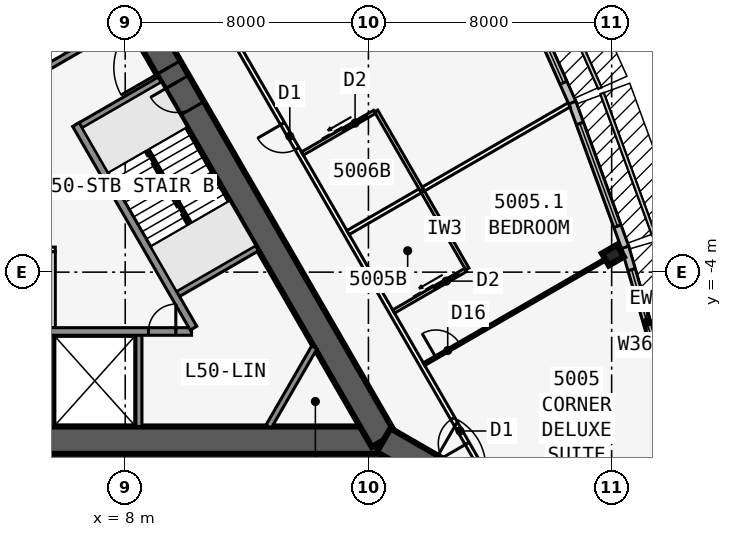
"""IFC4 building model, lengths in metres.
Left out: names, types, materials, properties, quantities, classifications, styles, units other than length and angle.
Written with IfcOpenShell. Run it as: python <this file> out.ifc"""

import sys

from ifc_helpers import new_model, si_unit, direction, frame, frame_2d, origin, origin_2d, place, context, subcontext, project, spatial, rectangle, i_section, extrude, element, fill, save


model = new_model("IFC4")
c1 = context("Model", 3, precision=1e-05, world=origin(), true_north=direction((0.0, 1.0)))
c2 = subcontext(c1, "Body", "Model", "MODEL_VIEW")
j1 = project(units=[si_unit("LENGTHUNIT", "METRE"), si_unit("PLANEANGLEUNIT", "RADIAN")], contexts=[c1])
p1 = place(None, origin())
s1 = spatial("IfcSite", under=j1, at=p1, CompositionType="ELEMENT")
p2 = place(p1, origin())
s2 = spatial("IfcBuilding", under=s1, at=p2, CompositionType="ELEMENT")
p3 = place(p2, frame((0.0, 0.0, 186.1)))
s3 = spatial("IfcBuildingStorey", under=s2, at=p3, CompositionType="ELEMENT", Elevation=186.1)
p4 = place(p3, frame((-16.5, -9.526, 0.0), z_axis=(0.0, 0.0, 1.0), x_axis=(1.0, 0.0, 0.0)))
e1 = element("IfcWall", 1, at=p4, inside=s3, PredefinedType="SHEAR", context=c2, shape_type="SweptSolid", body=[
    extrude(rectangle(XDim=33.0, YDim=0.9, at=frame_2d((16.5, 0.0))), origin(), (0.0, 0.0, 1.0), 3.4),
])
p5 = place(p4, frame((14.05, 0.0, 0.0)))
e2 = element("IfcOpeningElement", 2, at=p5, cuts=e1, PredefinedType="OPENING", context=c2, shape_type="SweptSolid", body=[
    extrude(rectangle(XDim=1.8, YDim=2.13, at=frame_2d((0.9, 1.065))), frame((0.0, 0.46, 0.0), z_axis=(0.0, -1.0, 0.0), x_axis=(1.0, 0.0, 0.0)), (0.0, 0.0, 1.0), 0.92),
])
p6 = place(p3, frame((-0.55, -5.951, 0.0), z_axis=(0.0, 0.0, 1.0), x_axis=(1.0, 0.0, 0.0)))
e3 = element("IfcWall", 3, at=p6, inside=s3, PredefinedType="SOLIDWALL", context=c2, shape_type="SweptSolid", body=[
    extrude(rectangle(XDim=10.733, YDim=0.25, at=frame_2d((5.366, 0.0))), origin(), (0.0, 0.0, 1.0), 3.15),
])
p7 = place(p6, frame((9.314, 0.0, 0.0)))
e4 = element("IfcOpeningElement", 4, at=p7, cuts=e3, PredefinedType="OPENING", context=c2, shape_type="SweptSolid", body=[
    extrude(rectangle(XDim=0.9, YDim=2.13, at=frame_2d((0.45, 1.065))), frame((0.0, 0.135, 0.0), z_axis=(0.0, -1.0, 0.0), x_axis=(1.0, 0.0, 0.0)), (0.0, 0.0, 1.0), 0.27),
])
p8 = place(p6, frame((1.05, 0.0, 0.0)))
e5 = element("IfcOpeningElement", 5, at=p8, cuts=e3, PredefinedType="OPENING", context=c2, shape_type="SweptSolid", body=[
    extrude(rectangle(XDim=1.1, YDim=2.13, at=frame_2d((0.55, 1.065))), frame((0.0, 0.135, 0.0), z_axis=(0.0, -1.0, 0.0), x_axis=(1.0, 0.0, 0.0)), (0.0, 0.0, 1.0), 0.27),
])
p9 = place(p6, frame((4.05, 0.0, 0.0)))
e6 = element("IfcOpeningElement", 6, at=p9, cuts=e3, PredefinedType="OPENING", context=c2, shape_type="SweptSolid", body=[
    extrude(rectangle(XDim=1.1, YDim=2.13, at=frame_2d((0.55, 1.065))), frame((0.0, 0.135, 0.0), z_axis=(0.0, -1.0, 0.0), x_axis=(1.0, 0.0, 0.0)), (0.0, 0.0, 1.0), 0.27),
])
for number, where, z_axis, x_axis in (
    (7, (5.55, -5.951, 0.0), (0.0, 0.0, 1.0), (0.0, -1.0, 0.0)),
    (8, (8.45, -5.951, 0.0), (0.0, 0.0, 1.0), (0.0, -1.0, 0.0)),
):
    element("IfcWall", number, at=place(p3, frame(where, z_axis=z_axis, x_axis=x_axis)), inside=s3, PredefinedType="SOLIDWALL", context=c2, shape_type="SweptSolid", body=[
        extrude(rectangle(XDim=3.125, YDim=0.2, at=frame_2d((1.562, 0.0))), origin(), (0.0, 0.0, 1.0), 3.15),
    ])
p10 = place(p3, frame((16.5, -9.526, 0.0), z_axis=(0.0, 0.0, 1.0), x_axis=(-0.499999749417, 0.866025548458, 0.0)))
e9 = element("IfcWall", 9, at=p10, inside=s3, PredefinedType="SHEAR", context=c2, shape_type="SweptSolid", body=[
    extrude(rectangle(XDim=33.0, YDim=0.9, at=frame_2d((16.5, 0.0))), origin(), (0.0, 0.0, 1.0), 3.4),
])
p11 = place(p10, frame((14.15, 0.0, 0.0)))
e10 = element("IfcOpeningElement", 10, at=p11, cuts=e9, PredefinedType="OPENING", context=c2, shape_type="SweptSolid", body=[
    extrude(rectangle(XDim=1.8, YDim=2.13, at=frame_2d((0.9, 1.065))), frame((0.0, 0.46, 0.0), z_axis=(0.0, -1.0, 0.0), x_axis=(1.0, 0.0, 0.0)), (0.0, 0.0, 1.0), 0.92),
])
p12 = place(p10, frame((12.6, 0.0, 0.0)))
e11 = element("IfcOpeningElement", 11, at=p12, cuts=e9, PredefinedType="OPENING", context=c2, shape_type="SweptSolid", body=[
    extrude(rectangle(XDim=1.0, YDim=2.13, at=frame_2d((0.5, 1.065))), frame((0.0, 0.46, 0.0), z_axis=(0.0, -1.0, 0.0), x_axis=(1.0, 0.0, 0.0)), (0.0, 0.0, 1.0), 0.92),
])
p13 = place(p3, frame((10.245, -5.843, 0.0), z_axis=(0.0, 0.0, 1.0), x_axis=(-0.499993009313, 0.866029439822, 0.0)))
e12 = element("IfcWall", 12, at=p13, inside=s3, PredefinedType="SOLIDWALL", context=c2, shape_type="SweptSolid", body=[
    extrude(rectangle(XDim=7.733, YDim=0.25, at=frame_2d((3.866, 0.0))), origin(), (0.0, 0.0, 1.0), 3.15),
])
for number, where, z_axis, x_axis in (
    (13, (9.629, -4.775, 0.0), (0.0, 0.0, 1.0), (0.866, 0.5, 0.0)),
    (14, (6.429, 0.767, 0.0), (0.0, 0.0, 1.0), (0.866, 0.5, 0.0)),
    (15, (5.329, 2.673, 0.0), (0.0, 0.0, 1.0), (0.866, 0.5, 0.0)),
):
    element("IfcWall", number, at=place(p3, frame(where, z_axis=z_axis, x_axis=x_axis)), inside=s3, PredefinedType="SOLIDWALL", context=c2, shape_type="SweptSolid", body=[
        extrude(rectangle(XDim=3.125, YDim=0.2, at=frame_2d((1.562, 0.0))), origin(), (0.0, 0.0, 1.0), 3.15),
    ])
p14 = place(p3, frame((16.5, -9.526, 0.0), z_axis=(0.0, 0.0, 1.0), x_axis=(0.866031398331, -0.499989616998, 0.0)))
e16 = element("IfcWall", 16, at=p14, inside=s3, PredefinedType="SHEAR", context=c2, shape_type="SweptSolid", body=[
    extrude(rectangle(XDim=4.746, YDim=0.9, at=frame_2d((2.373, 0.0))), origin(), (0.0, 0.0, 1.0), 3.4),
])
p15 = place(p14, frame((1.8, 0.0, 0.0)))
e17 = element("IfcOpeningElement", 17, at=p15, cuts=e16, PredefinedType="OPENING", context=c2, shape_type="SweptSolid", body=[
    extrude(rectangle(XDim=1.8, YDim=2.13, at=frame_2d((0.9, 1.065))), frame((0.0, 0.46, 0.0), z_axis=(0.0, -1.0, 0.0), x_axis=(1.0, 0.0, 0.0)), (0.0, 0.0, 1.0), 0.92),
])
p16 = place(p3, frame((24.041, -3.44, 0.0), z_axis=(0.0, 0.0, 1.0), x_axis=(-0.5, 0.866025403784, 0.0)))
e18 = element("IfcColumn", 18, at=p16, inside=s3, PredefinedType="COLUMN", context=c2, shape_type="SweptSolid", body=[
    extrude(i_section(OverallWidth=0.455, OverallDepth=0.569, WebThickness=0.078, FlangeThickness=0.125, at=origin_2d()), origin(), (0.0, 0.0, 1.0), 3.4),
])
p17 = place(p3, frame((25.88, -8.118, 0.0), z_axis=(0.0, 0.0, 1.0), x_axis=(-0.279528287117, 0.960137457191, 0.0)))
e19 = element("IfcWall", 19, at=p17, inside=s3, PredefinedType="STANDARD", context=c2, shape_type="SweptSolid", body=[
    extrude(rectangle(XDim=5.148, YDim=0.25, at=frame_2d((2.574, 0.0))), origin(), (0.0, 0.0, 1.0), 3.15),
])
p18 = place(p17, frame((0.774, 0.0, 0.45)))
e20 = element("IfcOpeningElement", 20, at=p18, cuts=e19, PredefinedType="OPENING", context=c2, shape_type="SweptSolid", body=[
    extrude(rectangle(XDim=3.6, YDim=2.4, at=frame_2d((1.8, 1.2))), frame((0.0, 0.135, 0.0), z_axis=(0.0, -1.0, 0.0), x_axis=(1.0, 0.0, 0.0)), (0.0, 0.0, 1.0), 0.27),
])
p19 = place(p3, frame((24.444, -3.183, 0.0), z_axis=(0.0, 0.0, 1.0), x_axis=(-0.343225593282, 0.939252996863, 0.0)))
e21 = element("IfcWall", 21, at=p19, inside=s3, PredefinedType="STANDARD", context=c2, shape_type="SweptSolid", body=[
    extrude(rectangle(XDim=5.076, YDim=0.25, at=frame_2d((2.538, 0.0))), origin(), (0.0, 0.0, 1.0), 3.15),
])
p20 = place(p19, frame((0.738, 0.0, 0.45)))
e22 = element("IfcOpeningElement", 22, at=p20, cuts=e21, PredefinedType="OPENING", context=c2, shape_type="SweptSolid", body=[
    extrude(rectangle(XDim=3.6, YDim=2.4, at=frame_2d((1.8, 1.2))), frame((0.0, 0.135, 0.0), z_axis=(0.0, -1.0, 0.0), x_axis=(1.0, 0.0, 0.0)), (0.0, 0.0, 1.0), 0.27),
])
p21 = place(p3, frame((22.705, 1.576, 0.0), z_axis=(0.0, 0.0, 1.0), x_axis=(-0.406832200364, 0.913502906808, 0.0)))
e23 = element("IfcWall", 23, at=p21, inside=s3, PredefinedType="STANDARD", context=c2, shape_type="SweptSolid", body=[
    extrude(rectangle(XDim=5.028, YDim=0.25, at=frame_2d((2.514, 0.0))), origin(), (0.0, 0.0, 1.0), 3.15),
])
p22 = place(p21, frame((0.714, 0.0, 0.45)))
e24 = element("IfcOpeningElement", 24, at=p22, cuts=e23, PredefinedType="OPENING", context=c2, shape_type="SweptSolid", body=[
    extrude(rectangle(XDim=3.6, YDim=2.4, at=frame_2d((1.8, 1.2))), frame((0.0, 0.135, 0.0), z_axis=(0.0, -1.0, 0.0), x_axis=(1.0, 0.0, 0.0)), (0.0, 0.0, 1.0), 0.27),
])
p23 = place(p3, frame((20.027, -10.985, 0.0), z_axis=(0.0, 0.0, 1.0), x_axis=(-0.500001677587, 0.866024435227, 0.0)))
e25 = element("IfcWall", 25, at=p23, inside=s3, PredefinedType="PARTITIONING", context=c2, shape_type="SweptSolid", body=[
    extrude(rectangle(XDim=39.054, YDim=0.15, at=frame_2d((19.527, 0.0))), origin(), (0.0, 0.0, 1.0), 3.15),
])
p24 = place(p23, frame((1.558, 0.0, 0.0)))
e26 = element("IfcOpeningElement", 26, at=p24, cuts=e25, PredefinedType="OPENING", context=c2, shape_type="SweptSolid", body=[
    extrude(rectangle(XDim=0.95, YDim=2.13, at=frame_2d((0.475, 1.065))), frame((0.0, 0.085, 0.0), z_axis=(0.0, -1.0, 0.0), x_axis=(1.0, 0.0, 0.0)), (0.0, 0.0, 1.0), 0.17),
])
p25 = place(p23, frame((12.752, 0.0, 0.0)))
e27 = element("IfcOpeningElement", 27, at=p25, cuts=e25, PredefinedType="OPENING", context=c2, shape_type="SweptSolid", body=[
    extrude(rectangle(XDim=0.95, YDim=2.13, at=frame_2d((0.475, 1.065))), frame((0.0, 0.085, 0.0), z_axis=(0.0, -1.0, 0.0), x_axis=(1.0, 0.0, 0.0)), (0.0, 0.0, 1.0), 0.17),
])
p26 = place(p23, frame((26.552, 0.0, 0.0)))
e28 = element("IfcOpeningElement", 28, at=p26, cuts=e25, PredefinedType="OPENING", context=c2, shape_type="SweptSolid", body=[
    extrude(rectangle(XDim=0.95, YDim=2.13, at=frame_2d((0.475, 1.065))), frame((0.0, 0.085, 0.0), z_axis=(0.0, -1.0, 0.0), x_axis=(1.0, 0.0, 0.0)), (0.0, 0.0, 1.0), 0.17),
])
p27 = place(p23, frame((37.752, 0.0, 0.0)))
e29 = element("IfcOpeningElement", 29, at=p27, cuts=e25, PredefinedType="OPENING", context=c2, shape_type="SweptSolid", body=[
    extrude(rectangle(XDim=0.95, YDim=2.13, at=frame_2d((0.475, 1.065))), frame((0.0, 0.085, 0.0), z_axis=(0.0, -1.0, 0.0), x_axis=(1.0, 0.0, 0.0)), (0.0, 0.0, 1.0), 0.17),
])
p28 = place(p3, frame((17.829, -7.027, 0.0), z_axis=(0.0, 0.0, 1.0), x_axis=(0.866029804378, 0.499992377871, 0.0)))
e30 = element("IfcWall", 30, at=p28, inside=s3, PredefinedType="PARTITIONING", context=c2, shape_type="SweptSolid", body=[
    extrude(rectangle(XDim=7.516, YDim=0.1, at=frame_2d((3.758, 0.0))), origin(), (0.0, 0.0, 1.0), 2.05),
])
p29 = place(p28, frame((0.45, 0.0, 0.0)))
e31 = element("IfcOpeningElement", 31, at=p29, cuts=e30, PredefinedType="OPENING", context=c2, shape_type="SweptSolid", body=[
    extrude(rectangle(XDim=0.9, YDim=2.032, at=frame_2d((0.45, 1.016))), frame((0.0, 0.06, 0.0), z_axis=(0.0, -1.0, 0.0), x_axis=(1.0, 0.0, 0.0)), (0.0, 0.0, 1.0), 0.12),
])
p30 = place(p3, frame((15.329, -2.697, 0.0), z_axis=(0.0, 0.0, 1.0), x_axis=(0.866024316602, 0.50000188305, 0.0)))
e32 = element("IfcWall", 32, at=p30, inside=s3, PredefinedType="PARTITIONING", context=c2, shape_type="SweptSolid", body=[
    extrude(rectangle(XDim=8.395, YDim=0.15, at=frame_2d((4.198, 0.0))), origin(), (0.0, 0.0, 1.0), 2.108),
])
p31 = place(p3, frame((19.253, -3.895, 0.0), z_axis=(0.0, 0.0, 1.0), x_axis=(-0.499990139034, 0.866031096941, 0.0)))
e33 = element("IfcWall", 33, at=p31, inside=s3, PredefinedType="PLUMBINGWALL", context=c2, shape_type="SweptSolid", body=[
    extrude(rectangle(XDim=3.0, YDim=0.12, at=frame_2d((1.5, 0.0))), origin(), (0.0, 0.0, 1.0), 3.15),
])
p32 = place(p3, frame((16.829, -5.295, 0.0), z_axis=(0.0, 0.0, 1.0), x_axis=(0.866035715982, 0.499982138324, 0.0)))
e34 = element("IfcWall", 34, at=p32, inside=s3, PredefinedType="PLUMBINGWALL", context=c2, shape_type="SweptSolid", body=[
    extrude(rectangle(XDim=2.74, YDim=0.12, at=frame_2d((1.37, 0.0))), origin(), (0.0, 0.0, 1.0), 3.15),
])
p33 = place(p32, frame((1.55, 0.0, 0.0)))
e35 = element("IfcOpeningElement", 35, at=p33, cuts=e34, PredefinedType="OPENING", context=c2, shape_type="SweptSolid", body=[
    extrude(rectangle(XDim=0.9, YDim=2.13, at=frame_2d((0.45, 1.065))), frame((0.0, 0.07, 0.0), z_axis=(0.0, -1.0, 0.0), x_axis=(1.0, 0.0, 0.0)), (0.0, 0.0, 1.0), 0.14),
])
p34 = place(p3, frame((17.753, -1.297, 0.0), z_axis=(0.0, 0.0, 1.0), x_axis=(-0.499990139034, 0.866031096941, 0.0)))
e36 = element("IfcWall", 36, at=p34, inside=s3, PredefinedType="PLUMBINGWALL", context=c2, shape_type="SweptSolid", body=[
    extrude(rectangle(XDim=3.0, YDim=0.12, at=frame_2d((1.5, 0.0))), origin(), (0.0, 0.0, 1.0), 3.15),
])
p35 = place(p3, frame((13.829, -0.099, 0.0), z_axis=(0.0, 0.0, 1.0), x_axis=(0.865997131366, 0.500048966069, 0.0)))
e37 = element("IfcWall", 37, at=p35, inside=s3, PredefinedType="PLUMBINGWALL", context=c2, shape_type="SweptSolid", body=[
    extrude(rectangle(XDim=2.74, YDim=0.12, at=frame_2d((1.37, 0.0))), origin(), (0.0, 0.0, 1.0), 3.15),
])
p36 = place(p35, frame((1.55, 0.0, 0.0)))
e38 = element("IfcOpeningElement", 38, at=p36, cuts=e37, PredefinedType="OPENING", context=c2, shape_type="SweptSolid", body=[
    extrude(rectangle(XDim=0.9, YDim=2.13, at=frame_2d((0.45, 1.065))), frame((0.0, 0.07, 0.0), z_axis=(0.0, -1.0, 0.0), x_axis=(1.0, 0.0, 0.0)), (0.0, 0.0, 1.0), 0.14),
])
p37 = place(p3, frame((-2.65, -3.251, 0.0), z_axis=(0.0, 0.0, 1.0), x_axis=(1.0, 0.0, 0.0)))
e39 = element("IfcWall", 39, at=p37, inside=s3, PredefinedType="PARTITIONING", context=c2, shape_type="SweptSolid", body=[
    extrude(rectangle(XDim=8.35, YDim=0.15, at=frame_2d((4.175, 0.0))), origin(), (0.0, 0.0, 1.0), 3.15),
])
p38 = place(p3, frame((5.625, -5.826, 0.0), z_axis=(0.0, 0.0, 1.0), x_axis=(0.0, 1.0, 0.0)))
e40 = element("IfcWall", 40, at=p38, inside=s3, PredefinedType="PARTITIONING", context=c2, shape_type="SweptSolid", body=[
    extrude(rectangle(XDim=2.5, YDim=0.15, at=frame_2d((1.25, 0.0))), origin(), (0.0, 0.0, 1.0), 3.15),
])
p39 = place(p3, frame((14.219, -6.476, 0.0), z_axis=(0.0, 0.0, 1.0), x_axis=(-0.499952404951, -0.866052881055, 0.0)))
e41 = element("IfcWall", 41, at=p39, inside=s3, PredefinedType="SOLIDWALL", context=c2, shape_type="SweptSolid", body=[
    extrude(rectangle(XDim=3.002, YDim=0.2, at=frame_2d((1.501, 0.0))), origin(), (0.0, 0.0, 1.0), 3.15),
])
p40 = place(p3, frame((10.135, -2.401, 0.0), z_axis=(0.0, 0.0, 1.0), x_axis=(-0.499992232847, 0.866029888106, 0.0)))
e42 = element("IfcWall", 42, at=p40, inside=s3, PredefinedType="SOLIDWALL", context=c2, shape_type="SweptSolid", body=[
    extrude(rectangle(XDim=2.794, YDim=0.1, at=frame_2d((1.397, 0.0))), origin(), (0.0, 0.0, 1.0), 3.4),
])
p41 = place(p18, origin())
e43 = element("IfcWindow", 43, at=p41, inside=s3, PartitioningType="SINGLE_PANEL", PredefinedType="WINDOW", context=c2, shape_type="SweptSolid", body=[
    extrude(rectangle(XDim=3.6, YDim=2.4, at=frame_2d((1.8, 1.2))), frame((0.0, 0.03, 0.0), z_axis=(0.0, -1.0, 0.0), x_axis=(1.0, 0.0, 0.0)), (0.0, 0.0, 1.0), 0.06),
])
fill(e20, e43)
p42 = place(p20, origin())
e44 = element("IfcWindow", 44, at=p42, inside=s3, PartitioningType="SINGLE_PANEL", PredefinedType="WINDOW", context=c2, shape_type="SweptSolid", body=[
    extrude(rectangle(XDim=3.6, YDim=2.4, at=frame_2d((1.8, 1.2))), frame((0.0, 0.03, 0.0), z_axis=(0.0, -1.0, 0.0), x_axis=(1.0, 0.0, 0.0)), (0.0, 0.0, 1.0), 0.06),
])
fill(e22, e44)
p43 = place(p22, origin())
e45 = element("IfcWindow", 45, at=p43, inside=s3, PartitioningType="SINGLE_PANEL", PredefinedType="WINDOW", context=c2, shape_type="SweptSolid", body=[
    extrude(rectangle(XDim=3.6, YDim=2.4, at=frame_2d((1.8, 1.2))), frame((0.0, 0.03, 0.0), z_axis=(0.0, -1.0, 0.0), x_axis=(1.0, 0.0, 0.0)), (0.0, 0.0, 1.0), 0.06),
])
fill(e24, e45)
p44 = place(p29, origin())
e46 = element("IfcDoor", 46, at=p44, inside=s3, OperationType="SINGLE_SWING_LEFT", PredefinedType="DOOR", context=c2, shape_type="SweptSolid", body=[
    extrude(rectangle(XDim=0.9, YDim=2.032, at=frame_2d((0.45, 1.016))), frame((0.0, 0.025, 0.0), z_axis=(0.0, -1.0, 0.0), x_axis=(1.0, 0.0, 0.0)), (0.0, 0.0, 1.0), 0.05),
])
fill(e31, e46)
p45 = place(p24, origin())
e47 = element("IfcDoor", 47, at=p45, inside=s3, OperationType="SINGLE_SWING_LEFT", PredefinedType="DOOR", context=c2, shape_type="SweptSolid", body=[
    extrude(rectangle(XDim=0.95, YDim=2.13, at=frame_2d((0.475, 1.065))), frame((0.0, 0.025, 0.0), z_axis=(0.0, -1.0, 0.0), x_axis=(1.0, 0.0, 0.0)), (0.0, 0.0, 1.0), 0.05),
])
fill(e26, e47)
p46 = place(p33, origin())
e48 = element("IfcDoor", 48, at=p46, inside=s3, OperationType="SLIDING_TO_LEFT", PredefinedType="DOOR", context=c2, shape_type="SweptSolid", body=[
    extrude(rectangle(XDim=0.9, YDim=2.13, at=frame_2d((0.45, 1.065))), frame((0.0, 0.025, 0.0), z_axis=(0.0, -1.0, 0.0), x_axis=(1.0, 0.0, 0.0)), (0.0, 0.0, 1.0), 0.05),
])
fill(e35, e48)
p47 = place(p36, origin())
e49 = element("IfcDoor", 49, at=p47, inside=s3, OperationType="SLIDING_TO_LEFT", PredefinedType="DOOR", context=c2, shape_type="SweptSolid", body=[
    extrude(rectangle(XDim=0.9, YDim=2.13, at=frame_2d((0.45, 1.065))), frame((0.0, 0.025, 0.0), z_axis=(0.0, -1.0, 0.0), x_axis=(1.0, 0.0, 0.0)), (0.0, 0.0, 1.0), 0.05),
])
fill(e38, e49)
p48 = place(p25, origin())
e50 = element("IfcDoor", 50, at=p48, inside=s3, OperationType="SINGLE_SWING_RIGHT", PredefinedType="DOOR", context=c2, shape_type="SweptSolid", body=[
    extrude(rectangle(XDim=0.95, YDim=2.13, at=frame_2d((0.475, 1.065))), frame((0.0, 0.025, 0.0), z_axis=(0.0, -1.0, 0.0), x_axis=(1.0, 0.0, 0.0)), (0.0, 0.0, 1.0), 0.05),
])
fill(e27, e50)
p49 = place(p11, origin())
e51 = element("IfcDoor", 51, at=p49, inside=s3, OperationType="DOUBLE_DOOR_SINGLE_SWING", PredefinedType="DOOR", context=c2, shape_type="SweptSolid", body=[
    extrude(rectangle(XDim=1.8, YDim=2.13, at=frame_2d((0.9, 1.065))), frame((0.0, 0.025, 0.0), z_axis=(0.0, -1.0, 0.0), x_axis=(1.0, 0.0, 0.0)), (0.0, 0.0, 1.0), 0.05),
])
fill(e10, e51)
p50 = place(p12, origin())
e52 = element("IfcDoor", 52, at=p50, inside=s3, OperationType="SINGLE_SWING_RIGHT", PredefinedType="DOOR", context=c2, shape_type="SweptSolid", body=[
    extrude(rectangle(XDim=1.0, YDim=2.13, at=frame_2d((0.5, 1.065))), frame((0.0, 0.025, 0.0), z_axis=(0.0, -1.0, 0.0), x_axis=(1.0, 0.0, 0.0)), (0.0, 0.0, 1.0), 0.05),
])
fill(e11, e52)
p51 = place(p7, origin())
e53 = element("IfcDoor", 53, at=p51, inside=s3, OperationType="SINGLE_SWING_RIGHT", PredefinedType="DOOR", context=c2, shape_type="SweptSolid", body=[
    extrude(rectangle(XDim=0.9, YDim=2.13, at=frame_2d((0.45, 1.065))), frame((0.0, 0.025, 0.0), z_axis=(0.0, -1.0, 0.0), x_axis=(1.0, 0.0, 0.0)), (0.0, 0.0, 1.0), 0.05),
])
fill(e4, e53)
save(model, sys.argv[1])
